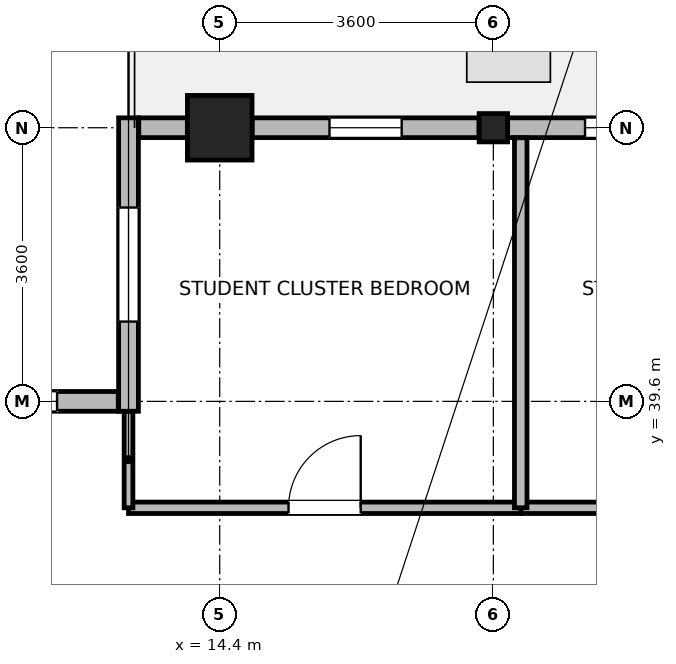
"""IFC4 building model, lengths in metres.
Left out: names, types, materials, properties, quantities, classifications, styles, units other than length and angle.
Written with IfcOpenShell. Run it as: python <this file> out.ifc"""

import sys

from ifc_helpers import new_model, si_unit, direction, frame, frame_2d, origin, origin_2d, place, context, subcontext, project, spatial, rectangle, i_section, extrude, source, transform, mapped, element, fill, save


model = new_model("IFC4")
c1 = context("Model", 3, precision=1e-05, world=origin(), true_north=direction((0.0, 1.0)))
c2 = subcontext(c1, "Body", "Model", "MODEL_VIEW")
j1 = project(units=[si_unit("LENGTHUNIT", "METRE"), si_unit("PLANEANGLEUNIT", "RADIAN")], contexts=[c1])
p1 = place(None, origin())
s1 = spatial("IfcSite", under=j1, at=p1, CompositionType="ELEMENT")
p2 = place(p1, origin())
s2 = spatial("IfcBuilding", under=s1, at=p2, CompositionType="ELEMENT")
p3 = place(p2, frame((0.0, 0.0, 283.2)))
s3 = spatial("IfcBuildingStorey", under=s2, at=p3, CompositionType="ELEMENT", Elevation=283.2)
m1 = source(origin(), c2, "Body", "SweptSolid", [
    extrude(rectangle(XDim=0.85, YDim=0.85, at=origin_2d()), origin(), (0.0, 0.0, 1.0), 3.7),
])
p4 = place(p3, frame((14.4, 43.2, 0.0), z_axis=(0.0, 0.0, 1.0), x_axis=(1.0, 0.0, 0.0)))
e1 = element("IfcColumn", 1, at=p4, inside=s3, PredefinedType="COLUMN", context=c2, shape_type="MappedRepresentation", body=[
    mapped(m1, transform((0.0, 0.0, 0.0), x_axis=(1.0, 0.0, 0.0), y_axis=(0.0, 1.0, 0.0), z_axis=(0.0, 0.0, 1.0), scale=1.0)),
])
m2 = source(origin(), c2, "Body", "SweptSolid", [
    extrude(i_section(OverallWidth=0.374, OverallDepth=0.372, WebThickness=0.015, FlangeThickness=0.026, FilletRadius=0.015, at=origin_2d()), origin(), (0.0, 0.0, 1.0), 3.7),
])
p5 = place(p3, frame((18.0, 43.2, 0.0), z_axis=(0.0, 0.0, 1.0), x_axis=(1.0, 0.0, 0.0)))
e2 = element("IfcColumn", 2, at=p5, inside=s3, PredefinedType="COLUMN", context=c2, shape_type="MappedRepresentation", body=[
    mapped(m2, transform((0.0, 0.0, 0.0), x_axis=(1.0, 0.0, 0.0), y_axis=(0.0, 1.0, 0.0), z_axis=(0.0, 0.0, 1.0), scale=1.0)),
])
p6 = place(p3, frame((18.188, 43.2, 0.0), z_axis=(0.0, 0.0, 1.0), x_axis=(1.0, 0.0, 0.0)))
e3 = element("IfcWall", 3, at=p6, inside=s3, PredefinedType="STANDARD", context=c2, shape_type="SweptSolid", body=[
    extrude(rectangle(XDim=2.986, YDim=0.26, at=frame_2d((1.493, 0.0))), origin(), (0.0, 0.0, 1.0), 3.055),
])
p7 = place(p6, frame((1.018, 0.0, 0.85)))
e4 = element("IfcOpeningElement", 4, at=p7, cuts=e3, PredefinedType="OPENING", context=c2, shape_type="SweptSolid", body=[
    extrude(rectangle(XDim=0.95, YDim=1.75, at=frame_2d((0.475, 0.875))), frame((0.0, 0.14, 0.0), z_axis=(0.0, -1.0, 0.0), x_axis=(1.0, 0.0, 0.0)), (0.0, 0.0, 1.0), 0.28),
])
p8 = place(p3, frame((14.826, 43.2, 0.0), z_axis=(0.0, 0.0, 1.0), x_axis=(1.0, 0.0, 0.0)))
e5 = element("IfcWall", 5, at=p8, inside=s3, PredefinedType="STANDARD", context=c2, shape_type="SweptSolid", body=[
    extrude(rectangle(XDim=2.986, YDim=0.26, at=frame_2d((1.493, 0.0))), origin(), (0.0, 0.0, 1.0), 3.055),
])
p9 = place(p8, frame((1.018, 0.0, 0.85)))
e6 = element("IfcOpeningElement", 6, at=p9, cuts=e5, PredefinedType="OPENING", context=c2, shape_type="SweptSolid", body=[
    extrude(rectangle(XDim=0.95, YDim=1.75, at=frame_2d((0.475, 0.875))), frame((0.0, 0.14, 0.0), z_axis=(0.0, -1.0, 0.0), x_axis=(1.0, 0.0, 0.0)), (0.0, 0.0, 1.0), 0.28),
])
p10 = place(p3, frame((13.335, 43.2, 0.0), z_axis=(0.0, 0.0, 1.0), x_axis=(1.0, 0.0, 0.0)))
e7 = element("IfcWall", 7, at=p10, inside=s3, PredefinedType="STANDARD", context=c2, shape_type="SweptSolid", body=[
    extrude(rectangle(XDim=0.639, YDim=0.26, at=frame_2d((0.32, 0.0))), origin(), (0.0, 0.0, 1.0), 3.455),
])
p11 = place(p3, frame((13.2, 39.47, 0.0), z_axis=(0.0, 0.0, 1.0), x_axis=(0.0, 1.0, 0.0)))
e8 = element("IfcWall", 8, at=p11, inside=s3, PredefinedType="STANDARD", context=c2, shape_type="SweptSolid", body=[
    extrude(rectangle(XDim=3.86, YDim=0.26, at=frame_2d((1.93, 0.0))), origin(), (0.0, 0.0, 1.0), 3.455),
])
p12 = place(p11, frame((1.18, 0.0, 0.85)))
e9 = element("IfcOpeningElement", 9, at=p12, cuts=e8, PredefinedType="OPENING", context=c2, shape_type="SweptSolid", body=[
    extrude(rectangle(XDim=1.5, YDim=1.85, at=frame_2d((0.75, 0.925))), frame((0.0, 0.14, 0.0), z_axis=(0.0, -1.0, 0.0), x_axis=(1.0, 0.0, 0.0)), (0.0, 0.0, 1.0), 0.28),
])
p13 = place(p3, frame((3.735, 39.6, 0.0), z_axis=(0.0, 0.0, 1.0), x_axis=(1.0, 0.0, 0.0)))
e10 = element("IfcWall", 10, at=p13, inside=s3, PredefinedType="STANDARD", context=c2, shape_type="SweptSolid", body=[
    extrude(rectangle(XDim=9.33, YDim=0.26, at=frame_2d((4.665, 0.0))), origin(), (0.0, 0.0, 1.0), 3.455),
])
p14 = place(p13, frame((0.805, 0.0, 0.85)))
e11 = element("IfcOpeningElement", 11, at=p14, cuts=e10, PredefinedType="OPENING", context=c2, shape_type="SweptSolid", body=[
    extrude(rectangle(XDim=1.5, YDim=1.85, at=frame_2d((0.75, 0.925))), frame((0.0, 0.14, 0.0), z_axis=(0.0, -1.0, 0.0), x_axis=(1.0, 0.0, 0.0)), (0.0, 0.0, 1.0), 0.28),
])
p15 = place(p13, frame((3.915, 0.0, 0.85)))
e12 = element("IfcOpeningElement", 12, at=p15, cuts=e10, PredefinedType="OPENING", context=c2, shape_type="SweptSolid", body=[
    extrude(rectangle(XDim=1.5, YDim=1.85, at=frame_2d((0.75, 0.925))), frame((0.0, 0.14, 0.0), z_axis=(0.0, -1.0, 0.0), x_axis=(1.0, 0.0, 0.0)), (0.0, 0.0, 1.0), 0.28),
])
p16 = place(p13, frame((7.025, 0.0, 0.85)))
e13 = element("IfcOpeningElement", 13, at=p16, cuts=e10, PredefinedType="OPENING", context=c2, shape_type="SweptSolid", body=[
    extrude(rectangle(XDim=1.5, YDim=1.85, at=frame_2d((0.75, 0.925))), frame((0.0, 0.14, 0.0), z_axis=(0.0, -1.0, 0.0), x_axis=(1.0, 0.0, 0.0)), (0.0, 0.0, 1.0), 0.28),
])
p17 = place(p3, frame((18.36, 38.2, 0.0), z_axis=(0.0, 0.0, 1.0), x_axis=(1.0, 0.0, 0.0)))
e14 = element("IfcWall", 14, at=p17, inside=s3, PredefinedType="PARTITIONING", context=c2, shape_type="SweptSolid", body=[
    extrude(rectangle(XDim=5.44, YDim=0.15, at=frame_2d((2.72, 0.0))), origin(), (0.0, 0.0, 1.0), 3.455),
])
p18 = place(p17, frame((2.245, 0.0, 0.0)))
e15 = element("IfcOpeningElement", 15, at=p18, cuts=e14, PredefinedType="OPENING", context=c2, shape_type="SweptSolid", body=[
    extrude(rectangle(XDim=0.95, YDim=2.1, at=frame_2d((0.475, 1.05))), frame((0.0, 0.085, 0.0), z_axis=(0.0, -1.0, 0.0), x_axis=(1.0, 0.0, 0.0)), (0.0, 0.0, 1.0), 0.17),
])
p19 = place(p3, frame((13.2, 38.2, 0.0), z_axis=(0.0, 0.0, 1.0), x_axis=(1.0, 0.0, 0.0)))
e16 = element("IfcWall", 16, at=p19, inside=s3, PredefinedType="PARTITIONING", context=c2, shape_type="SweptSolid", body=[
    extrude(rectangle(XDim=5.16, YDim=0.15, at=frame_2d((2.58, 0.0))), origin(), (0.0, 0.0, 1.0), 3.455),
])
p20 = place(p19, frame((2.105, 0.0, 0.0)))
e17 = element("IfcOpeningElement", 17, at=p20, cuts=e16, PredefinedType="OPENING", context=c2, shape_type="SweptSolid", body=[
    extrude(rectangle(XDim=0.95, YDim=2.1, at=frame_2d((0.475, 1.05))), frame((0.0, 0.085, 0.0), z_axis=(0.0, -1.0, 0.0), x_axis=(1.0, 0.0, 0.0)), (0.0, 0.0, 1.0), 0.17),
])
p21 = place(p3, frame((13.2, 38.2, 0.0), z_axis=(0.0, 0.0, 1.0), x_axis=(0.0, 1.0, 0.0)))
e18 = element("IfcWall", 18, at=p21, inside=s3, PredefinedType="PARTITIONING", context=c2, shape_type="SweptSolid", body=[
    extrude(rectangle(XDim=1.268, YDim=0.115, at=frame_2d((0.634, 0.0))), origin(), (0.0, 0.0, 1.0), 3.455),
])
p22 = place(p3, frame((18.36, 38.2, 0.0), z_axis=(0.0, 0.0, 1.0), x_axis=(0.0, 1.0, 0.0)))
e19 = element("IfcWall", 19, at=p22, inside=s3, PredefinedType="PARTITIONING", context=c2, shape_type="SweptSolid", body=[
    extrude(rectangle(XDim=4.868, YDim=0.165, at=frame_2d((2.434, 0.0))), origin(), (0.0, 0.0, 1.0), 3.455),
])
p23 = place(p7, origin())
e20 = element("IfcWindow", 20, at=p23, inside=s3, PartitioningType="SINGLE_PANEL", PredefinedType="WINDOW", context=c2, shape_type="SweptSolid", body=[
    extrude(rectangle(XDim=0.95, YDim=1.75, at=frame_2d((0.475, 0.875))), frame((0.0, 0.03, 0.0), z_axis=(0.0, -1.0, 0.0), x_axis=(1.0, 0.0, 0.0)), (0.0, 0.0, 1.0), 0.06),
])
fill(e4, e20)
p24 = place(p9, origin())
e21 = element("IfcWindow", 21, at=p24, inside=s3, PartitioningType="SINGLE_PANEL", PredefinedType="WINDOW", context=c2, shape_type="SweptSolid", body=[
    extrude(rectangle(XDim=0.95, YDim=1.75, at=frame_2d((0.475, 0.875))), frame((0.0, 0.03, 0.0), z_axis=(0.0, -1.0, 0.0), x_axis=(1.0, 0.0, 0.0)), (0.0, 0.0, 1.0), 0.06),
])
fill(e6, e21)
p25 = place(p12, origin())
e22 = element("IfcWindow", 22, at=p25, inside=s3, PartitioningType="SINGLE_PANEL", PredefinedType="WINDOW", context=c2, shape_type="SweptSolid", body=[
    extrude(rectangle(XDim=1.5, YDim=1.85, at=frame_2d((0.75, 0.925))), frame((0.0, 0.03, 0.0), z_axis=(0.0, -1.0, 0.0), x_axis=(1.0, 0.0, 0.0)), (0.0, 0.0, 1.0), 0.06),
])
fill(e9, e22)
p26 = place(p16, origin())
e23 = element("IfcWindow", 23, at=p26, inside=s3, PartitioningType="SINGLE_PANEL", PredefinedType="WINDOW", context=c2, shape_type="SweptSolid", body=[
    extrude(rectangle(XDim=1.5, YDim=1.85, at=frame_2d((0.75, 0.925))), frame((0.0, 0.03, 0.0), z_axis=(0.0, -1.0, 0.0), x_axis=(1.0, 0.0, 0.0)), (0.0, 0.0, 1.0), 0.06),
])
fill(e13, e23)
p27 = place(p20, origin())
e24 = element("IfcDoor", 24, at=p27, inside=s3, OperationType="SINGLE_SWING_RIGHT", PredefinedType="DOOR", context=c2, shape_type="SweptSolid", body=[
    extrude(rectangle(XDim=0.95, YDim=2.1, at=frame_2d((0.475, 1.05))), frame((0.0, 0.025, 0.0), z_axis=(0.0, -1.0, 0.0), x_axis=(1.0, 0.0, 0.0)), (0.0, 0.0, 1.0), 0.05),
])
fill(e17, e24)
save(model, sys.argv[1])
